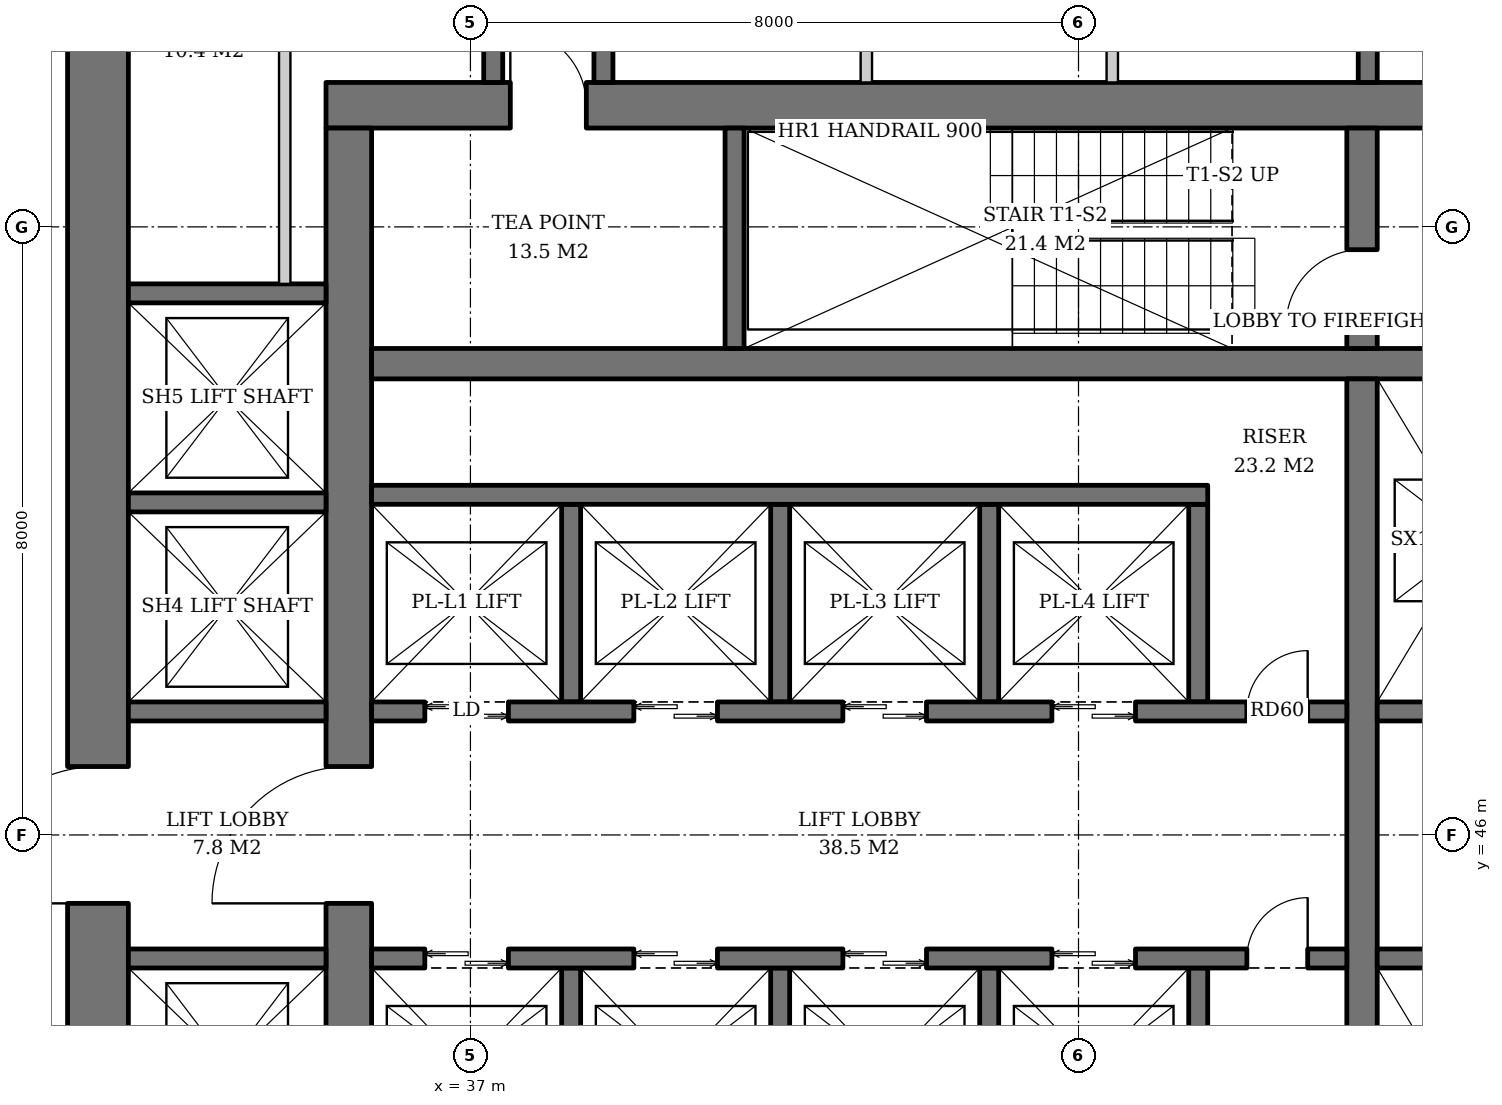
"""IFC4 building model, lengths in metres.
Left out: names, types, materials, properties, quantities, classifications, styles, units other than length and angle.
Written with IfcOpenShell. Run it as: python <this file> out.ifc"""

import sys

from ifc_helpers import new_model, si_unit, direction, frame, frame_2d, origin, place, context, subcontext, project, spatial, rectangle, extrude, element, fill, save


model = new_model("IFC4")
c1 = context("Model", 3, precision=1e-05, world=origin(), true_north=direction((0.0, 1.0)))
c2 = subcontext(c1, "Body", "Model", "MODEL_VIEW")
j1 = project(units=[si_unit("LENGTHUNIT", "METRE"), si_unit("PLANEANGLEUNIT", "RADIAN")], contexts=[c1])
p1 = place(None, origin())
s1 = spatial("IfcSite", under=j1, at=p1, CompositionType="ELEMENT")
p2 = place(p1, origin())
s2 = spatial("IfcBuilding", under=s1, at=p2, CompositionType="ELEMENT")
p3 = place(p2, frame((0.0, 0.0, 59.0)))
s3 = spatial("IfcBuildingStorey", under=s2, at=p3, CompositionType="ELEMENT", Elevation=59.0)
p4 = place(p3, frame((35.1, 55.6, 0.0), z_axis=(0.0, 0.0, 1.0), x_axis=(1.0, 0.0, 0.0)))
e1 = element("IfcWall", 1, at=p4, inside=s3, PredefinedType="SHEAR", context=c2, shape_type="SweptSolid", body=[
    extrude(rectangle(XDim=19.8, YDim=0.6, at=frame_2d((9.9, 0.0))), origin(), (0.0, 0.0, 1.0), 3.8),
])
p5 = place(p4, frame((14.54, 0.0, 0.0)))
e2 = element("IfcOpeningElement", 2, at=p5, cuts=e1, PredefinedType="OPENING", context=c2, shape_type="SweptSolid", body=[
    extrude(rectangle(XDim=1.0, YDim=2.1, at=frame_2d((0.5, 1.05))), frame((0.0, 0.31, 0.0), z_axis=(0.0, -1.0, 0.0), x_axis=(1.0, 0.0, 0.0)), (0.0, 0.0, 1.0), 0.62),
])
p6 = place(p4, frame((2.425, 0.0, 0.0)))
e3 = element("IfcOpeningElement", 3, at=p6, cuts=e1, PredefinedType="OPENING", context=c2, shape_type="SweptSolid", body=[
    extrude(rectangle(XDim=1.0, YDim=2.1, at=frame_2d((0.5, 1.05))), frame((0.0, 0.31, 0.0), z_axis=(0.0, -1.0, 0.0), x_axis=(1.0, 0.0, 0.0)), (0.0, 0.0, 1.0), 0.62),
])
p7 = place(p3, frame((35.4, 36.7, 0.0), z_axis=(0.0, 0.0, 1.0), x_axis=(0.0, 1.0, 0.0)))
e4 = element("IfcWall", 4, at=p7, inside=s3, PredefinedType="SHEAR", context=c2, shape_type="SweptSolid", body=[
    extrude(rectangle(XDim=18.6, YDim=0.6, at=frame_2d((9.3, 0.0))), origin(), (0.0, 0.0, 1.0), 3.8),
])
p8 = place(p7, frame((8.4, 0.0, 0.0)))
e5 = element("IfcOpeningElement", 5, at=p8, cuts=e4, PredefinedType="OPENING", context=c2, shape_type="SweptSolid", body=[
    extrude(rectangle(XDim=1.8, YDim=2.4, at=frame_2d((0.9, 1.2))), frame((0.0, 0.31, 0.0), z_axis=(0.0, -1.0, 0.0), x_axis=(1.0, 0.0, 0.0)), (0.0, 0.0, 1.0), 0.62),
])
p9 = place(p3, frame((32.1, 33.5, 0.0), z_axis=(0.0, 0.0, 1.0), x_axis=(0.0, 1.0, 0.0)))
e6 = element("IfcWall", 6, at=p9, inside=s3, PredefinedType="SHEAR", context=c2, shape_type="SweptSolid", body=[
    extrude(rectangle(XDim=25.0, YDim=0.8, at=frame_2d((12.5, 0.0))), origin(), (0.0, 0.0, 1.0), 3.8),
])
p10 = place(p9, frame((11.6, 0.0, 0.0)))
e7 = element("IfcOpeningElement", 7, at=p10, cuts=e6, PredefinedType="OPENING", context=c2, shape_type="SweptSolid", body=[
    extrude(rectangle(XDim=1.8, YDim=2.4, at=frame_2d((0.9, 1.2))), frame((0.0, 0.41, 0.0), z_axis=(0.0, -1.0, 0.0), x_axis=(1.0, 0.0, 0.0)), (0.0, 0.0, 1.0), 0.82),
])
p11 = place(p3, frame((35.7, 52.2, 0.0), z_axis=(0.0, 0.0, 1.0), x_axis=(1.0, 0.0, 0.0)))
e8 = element("IfcWall", 8, at=p11, inside=s3, PredefinedType="SHEAR", context=c2, shape_type="SweptSolid", body=[
    extrude(rectangle(XDim=18.6, YDim=0.4, at=frame_2d((9.3, 0.0))), origin(), (0.0, 0.0, 1.0), 3.8),
])
p12 = place(p3, frame((48.73, 40.0, 0.0), z_axis=(0.0, 0.0, 1.0), x_axis=(0.0, 1.0, 0.0)))
e9 = element("IfcWall", 9, at=p12, inside=s3, PredefinedType="SHEAR", context=c2, shape_type="SweptSolid", body=[
    extrude(rectangle(XDim=12.0, YDim=0.4, at=frame_2d((6.0, 0.0))), origin(), (0.0, 0.0, 1.0), 3.8),
])
p13 = place(p3, frame((48.73, 52.4, 0.0), z_axis=(0.0, 0.0, 1.0), x_axis=(0.0, 1.0, 0.0)))
e10 = element("IfcWall", 10, at=p13, inside=s3, PredefinedType="SHEAR", context=c2, shape_type="SweptSolid", body=[
    extrude(rectangle(XDim=2.9, YDim=0.4, at=frame_2d((1.45, 0.0))), origin(), (0.0, 0.0, 1.0), 3.8),
])
p14 = place(p13, frame((0.3, 0.0, 0.0)))
e11 = element("IfcOpeningElement", 11, at=p14, cuts=e10, PredefinedType="OPENING", context=c2, shape_type="SweptSolid", body=[
    extrude(rectangle(XDim=1.0, YDim=2.1, at=frame_2d((0.5, 1.05))), frame((0.0, 0.21, 0.0), z_axis=(0.0, -1.0, 0.0), x_axis=(1.0, 0.0, 0.0)), (0.0, 0.0, 1.0), 0.42),
])
p15 = place(p3, frame((40.475, 52.4, 0.0), z_axis=(0.0, 0.0, 1.0), x_axis=(0.0, 1.0, 0.0)))
e12 = element("IfcWall", 12, at=p15, inside=s3, PredefinedType="SHEAR", context=c2, shape_type="SweptSolid", body=[
    extrude(rectangle(XDim=2.9, YDim=0.25, at=frame_2d((1.45, 0.0))), origin(), (0.0, 0.0, 1.0), 3.8),
])
for number, where, z_axis, x_axis in (
    (13, (38.325, 47.75, 0.0), (0.0, 0.0, 1.0), (0.0, 1.0, 0.0)),
    (14, (41.075, 47.75, 0.0), (0.0, 0.0, 1.0), (0.0, 1.0, 0.0)),
    (15, (43.825, 47.75, 0.0), (0.0, 0.0, 1.0), (0.0, 1.0, 0.0)),
    (16, (46.575, 47.75, 0.0), (0.0, 0.0, 1.0), (0.0, 1.0, 0.0)),
):
    element("IfcWall", number, at=place(p3, frame(where, z_axis=z_axis, x_axis=x_axis)), inside=s3, PredefinedType="SHEAR", context=c2, shape_type="SweptSolid", body=[
        extrude(rectangle(XDim=2.6, YDim=0.25, at=frame_2d((1.3, 0.0))), origin(), (0.0, 0.0, 1.0), 3.8),
    ])
p16 = place(p3, frame((35.7, 50.475, 0.0), z_axis=(0.0, 0.0, 1.0), x_axis=(1.0, 0.0, 0.0)))
e17 = element("IfcWall", 17, at=p16, inside=s3, PredefinedType="SHEAR", context=c2, shape_type="SweptSolid", body=[
    extrude(rectangle(XDim=11.0, YDim=0.25, at=frame_2d((5.5, 0.0))), origin(), (0.0, 0.0, 1.0), 3.8),
])
p17 = place(p3, frame((35.7, 47.625, 0.0), z_axis=(0.0, 0.0, 1.0), x_axis=(1.0, 0.0, 0.0)))
e18 = element("IfcWall", 18, at=p17, inside=s3, PredefinedType="SHEAR", context=c2, shape_type="SweptSolid", body=[
    extrude(rectangle(XDim=12.83, YDim=0.25, at=frame_2d((6.415, 0.0))), origin(), (0.0, 0.0, 1.0), 3.8),
])
p18 = place(p17, frame((0.7, 0.0, 0.0)))
e19 = element("IfcOpeningElement", 19, at=p18, cuts=e18, PredefinedType="OPENING", context=c2, shape_type="SweptSolid", body=[
    extrude(rectangle(XDim=1.1, YDim=2.2, at=frame_2d((0.55, 1.1))), frame((0.0, 0.135, 0.0), z_axis=(0.0, -1.0, 0.0), x_axis=(1.0, 0.0, 0.0)), (0.0, 0.0, 1.0), 0.27),
])
p19 = place(p17, frame((3.45, 0.0, 0.0)))
e20 = element("IfcOpeningElement", 20, at=p19, cuts=e18, PredefinedType="OPENING", context=c2, shape_type="SweptSolid", body=[
    extrude(rectangle(XDim=1.1, YDim=2.2, at=frame_2d((0.55, 1.1))), frame((0.0, 0.135, 0.0), z_axis=(0.0, -1.0, 0.0), x_axis=(1.0, 0.0, 0.0)), (0.0, 0.0, 1.0), 0.27),
])
p20 = place(p17, frame((6.2, 0.0, 0.0)))
e21 = element("IfcOpeningElement", 21, at=p20, cuts=e18, PredefinedType="OPENING", context=c2, shape_type="SweptSolid", body=[
    extrude(rectangle(XDim=1.1, YDim=2.2, at=frame_2d((0.55, 1.1))), frame((0.0, 0.135, 0.0), z_axis=(0.0, -1.0, 0.0), x_axis=(1.0, 0.0, 0.0)), (0.0, 0.0, 1.0), 0.27),
])
p21 = place(p17, frame((8.95, 0.0, 0.0)))
e22 = element("IfcOpeningElement", 22, at=p21, cuts=e18, PredefinedType="OPENING", context=c2, shape_type="SweptSolid", body=[
    extrude(rectangle(XDim=1.1, YDim=2.2, at=frame_2d((0.55, 1.1))), frame((0.0, 0.135, 0.0), z_axis=(0.0, -1.0, 0.0), x_axis=(1.0, 0.0, 0.0)), (0.0, 0.0, 1.0), 0.27),
])
p22 = place(p17, frame((11.515, 0.0, 0.0)))
e23 = element("IfcOpeningElement", 23, at=p22, cuts=e18, PredefinedType="OPENING", context=c2, shape_type="SweptSolid", body=[
    extrude(rectangle(XDim=0.8, YDim=2.0, at=frame_2d((0.4, 1.0))), frame((0.0, 0.135, 0.0), z_axis=(0.0, -1.0, 0.0), x_axis=(1.0, 0.0, 0.0)), (0.0, 0.0, 1.0), 0.27),
])
for number, where, z_axis, x_axis in (
    (24, (38.325, 44.25, 0.0), (0.0, 0.0, 1.0), (0.0, -1.0, 0.0)),
    (25, (41.075, 44.25, 0.0), (0.0, 0.0, 1.0), (0.0, -1.0, 0.0)),
    (26, (43.825, 44.25, 0.0), (0.0, 0.0, 1.0), (0.0, -1.0, 0.0)),
    (27, (46.575, 44.25, 0.0), (0.0, 0.0, 1.0), (0.0, -1.0, 0.0)),
):
    element("IfcWall", number, at=place(p3, frame(where, z_axis=z_axis, x_axis=x_axis)), inside=s3, PredefinedType="SHEAR", context=c2, shape_type="SweptSolid", body=[
        extrude(rectangle(XDim=2.6, YDim=0.25, at=frame_2d((1.3, 0.0))), origin(), (0.0, 0.0, 1.0), 3.8),
    ])
p23 = place(p3, frame((35.7, 44.375, 0.0), z_axis=(0.0, 0.0, 1.0), x_axis=(1.0, 0.0, 0.0)))
e28 = element("IfcWall", 28, at=p23, inside=s3, PredefinedType="SHEAR", context=c2, shape_type="SweptSolid", body=[
    extrude(rectangle(XDim=12.83, YDim=0.25, at=frame_2d((6.415, 0.0))), origin(), (0.0, 0.0, 1.0), 3.8),
])
p24 = place(p23, frame((0.7, 0.0, 0.0)))
e29 = element("IfcOpeningElement", 29, at=p24, cuts=e28, PredefinedType="OPENING", context=c2, shape_type="SweptSolid", body=[
    extrude(rectangle(XDim=1.1, YDim=2.2, at=frame_2d((0.55, 1.1))), frame((0.0, 0.135, 0.0), z_axis=(0.0, -1.0, 0.0), x_axis=(1.0, 0.0, 0.0)), (0.0, 0.0, 1.0), 0.27),
])
p25 = place(p23, frame((3.45, 0.0, 0.0)))
e30 = element("IfcOpeningElement", 30, at=p25, cuts=e28, PredefinedType="OPENING", context=c2, shape_type="SweptSolid", body=[
    extrude(rectangle(XDim=1.1, YDim=2.2, at=frame_2d((0.55, 1.1))), frame((0.0, 0.135, 0.0), z_axis=(0.0, -1.0, 0.0), x_axis=(1.0, 0.0, 0.0)), (0.0, 0.0, 1.0), 0.27),
])
p26 = place(p23, frame((6.2, 0.0, 0.0)))
e31 = element("IfcOpeningElement", 31, at=p26, cuts=e28, PredefinedType="OPENING", context=c2, shape_type="SweptSolid", body=[
    extrude(rectangle(XDim=1.1, YDim=2.2, at=frame_2d((0.55, 1.1))), frame((0.0, 0.135, 0.0), z_axis=(0.0, -1.0, 0.0), x_axis=(1.0, 0.0, 0.0)), (0.0, 0.0, 1.0), 0.27),
])
p27 = place(p23, frame((8.95, 0.0, 0.0)))
e32 = element("IfcOpeningElement", 32, at=p27, cuts=e28, PredefinedType="OPENING", context=c2, shape_type="SweptSolid", body=[
    extrude(rectangle(XDim=1.1, YDim=2.2, at=frame_2d((0.55, 1.1))), frame((0.0, 0.135, 0.0), z_axis=(0.0, -1.0, 0.0), x_axis=(1.0, 0.0, 0.0)), (0.0, 0.0, 1.0), 0.27),
])
p28 = place(p23, frame((11.515, 0.0, 0.0)))
e33 = element("IfcOpeningElement", 33, at=p28, cuts=e28, PredefinedType="OPENING", context=c2, shape_type="SweptSolid", body=[
    extrude(rectangle(XDim=0.8, YDim=2.0, at=frame_2d((0.4, 1.0))), frame((0.0, 0.135, 0.0), z_axis=(0.0, -1.0, 0.0), x_axis=(1.0, 0.0, 0.0)), (0.0, 0.0, 1.0), 0.27),
])
for number, where, z_axis, x_axis in (
    (34, (48.93, 47.625, 0.0), (0.0, 0.0, 1.0), (1.0, 0.0, 0.0)),
    (35, (48.93, 44.375, 0.0), (0.0, 0.0, 1.0), (1.0, 0.0, 0.0)),
):
    element("IfcWall", number, at=place(p3, frame(where, z_axis=z_axis, x_axis=x_axis)), inside=s3, PredefinedType="SHEAR", context=c2, shape_type="SweptSolid", body=[
        extrude(rectangle(XDim=5.37, YDim=0.25, at=frame_2d((2.685, 0.0))), origin(), (0.0, 0.0, 1.0), 3.8),
    ])
for number, where, z_axis, x_axis in (
    (36, (32.5, 44.375, 0.0), (0.0, 0.0, 1.0), (1.0, 0.0, 0.0)),
    (37, (32.5, 47.625, 0.0), (0.0, 0.0, 1.0), (1.0, 0.0, 0.0)),
    (38, (32.5, 50.375, 0.0), (0.0, 0.0, 1.0), (1.0, 0.0, 0.0)),
    (39, (32.5, 53.125, 0.0), (0.0, 0.0, 1.0), (1.0, 0.0, 0.0)),
):
    element("IfcWall", number, at=place(p3, frame(where, z_axis=z_axis, x_axis=x_axis)), inside=s3, PredefinedType="SHEAR", context=c2, shape_type="SweptSolid", body=[
        extrude(rectangle(XDim=2.6, YDim=0.25, at=frame_2d((1.3, 0.0))), origin(), (0.0, 0.0, 1.0), 3.8),
    ])
for number, where, z_axis, x_axis in (
    (40, (48.805, 55.9, 0.0), (0.0, 0.0, 1.0), (0.0, 1.0, 0.0)),
    (41, (37.3, 55.9, 0.0), (0.0, 0.0, 1.0), (0.0, 1.0, 0.0)),
    (42, (38.75, 55.9, 0.0), (0.0, 0.0, 1.0), (0.0, 1.0, 0.0)),
):
    element("IfcWall", number, at=place(p3, frame(where, z_axis=z_axis, x_axis=x_axis)), inside=s3, PredefinedType="SOLIDWALL", context=c2, shape_type="SweptSolid", body=[
        extrude(rectangle(XDim=2.6, YDim=0.25, at=frame_2d((1.3, 0.0))), origin(), (0.0, 0.0, 1.0), 3.62),
    ])
p29 = place(p3, frame((34.557, 53.25, 0.0), z_axis=(0.0, 0.0, 1.0), x_axis=(0.0, 1.0, 0.0)))
e43 = element("IfcWall", 43, at=p29, inside=s3, PredefinedType="SOLIDWALL", context=c2, shape_type="SweptSolid", body=[
    extrude(rectangle(XDim=5.25, YDim=0.15, at=frame_2d((2.625, 0.0))), origin(), (0.0, 0.0, 1.0), 3.62),
])
for number, where, z_axis, x_axis in (
    (44, (42.209, 55.9, 0.0), (0.0, 0.0, 1.0), (0.0, 1.0, 0.0)),
    (45, (45.444, 55.9, 0.0), (0.0, 0.0, 1.0), (0.0, 1.0, 0.0)),
):
    element("IfcWall", number, at=place(p3, frame(where, z_axis=z_axis, x_axis=x_axis)), inside=s3, PredefinedType="SOLIDWALL", context=c2, shape_type="SweptSolid", body=[
        extrude(rectangle(XDim=2.6, YDim=0.15, at=frame_2d((1.3, 0.0))), origin(), (0.0, 0.0, 1.0), 3.62),
    ])
p30 = place(p18, origin())
e46 = element("IfcDoor", 46, at=p30, inside=s3, OperationType="DOUBLE_DOOR_SLIDING", PredefinedType="DOOR", context=c2, shape_type="SweptSolid", body=[
    extrude(rectangle(XDim=1.1, YDim=2.2, at=frame_2d((0.55, 1.1))), frame((0.0, 0.025, 0.0), z_axis=(0.0, -1.0, 0.0), x_axis=(1.0, 0.0, 0.0)), (0.0, 0.0, 1.0), 0.05),
])
fill(e19, e46)
p31 = place(p19, origin())
e47 = element("IfcDoor", 47, at=p31, inside=s3, OperationType="DOUBLE_DOOR_SLIDING", PredefinedType="DOOR", context=c2, shape_type="SweptSolid", body=[
    extrude(rectangle(XDim=1.1, YDim=2.2, at=frame_2d((0.55, 1.1))), frame((0.0, 0.025, 0.0), z_axis=(0.0, -1.0, 0.0), x_axis=(1.0, 0.0, 0.0)), (0.0, 0.0, 1.0), 0.05),
])
fill(e20, e47)
p32 = place(p20, origin())
e48 = element("IfcDoor", 48, at=p32, inside=s3, OperationType="DOUBLE_DOOR_SLIDING", PredefinedType="DOOR", context=c2, shape_type="SweptSolid", body=[
    extrude(rectangle(XDim=1.1, YDim=2.2, at=frame_2d((0.55, 1.1))), frame((0.0, 0.025, 0.0), z_axis=(0.0, -1.0, 0.0), x_axis=(1.0, 0.0, 0.0)), (0.0, 0.0, 1.0), 0.05),
])
fill(e21, e48)
p33 = place(p21, origin())
e49 = element("IfcDoor", 49, at=p33, inside=s3, OperationType="DOUBLE_DOOR_SLIDING", PredefinedType="DOOR", context=c2, shape_type="SweptSolid", body=[
    extrude(rectangle(XDim=1.1, YDim=2.2, at=frame_2d((0.55, 1.1))), frame((0.0, 0.025, 0.0), z_axis=(0.0, -1.0, 0.0), x_axis=(1.0, 0.0, 0.0)), (0.0, 0.0, 1.0), 0.05),
])
fill(e22, e49)
p34 = place(p22, origin())
e50 = element("IfcDoor", 50, at=p34, inside=s3, OperationType="SINGLE_SWING_RIGHT", PredefinedType="DOOR", context=c2, shape_type="SweptSolid", body=[
    extrude(rectangle(XDim=0.8, YDim=2.0, at=frame_2d((0.4, 1.0))), frame((0.0, 0.025, 0.0), z_axis=(0.0, -1.0, 0.0), x_axis=(1.0, 0.0, 0.0)), (0.0, 0.0, 1.0), 0.05),
])
fill(e23, e50)
p35 = place(p24, origin())
e51 = element("IfcDoor", 51, at=p35, inside=s3, OperationType="DOUBLE_DOOR_SLIDING", PredefinedType="DOOR", context=c2, shape_type="SweptSolid", body=[
    extrude(rectangle(XDim=1.1, YDim=2.2, at=frame_2d((0.55, 1.1))), frame((0.0, 0.025, 0.0), z_axis=(0.0, -1.0, 0.0), x_axis=(1.0, 0.0, 0.0)), (0.0, 0.0, 1.0), 0.05),
])
fill(e29, e51)
p36 = place(p25, origin())
e52 = element("IfcDoor", 52, at=p36, inside=s3, OperationType="DOUBLE_DOOR_SLIDING", PredefinedType="DOOR", context=c2, shape_type="SweptSolid", body=[
    extrude(rectangle(XDim=1.1, YDim=2.2, at=frame_2d((0.55, 1.1))), frame((0.0, 0.025, 0.0), z_axis=(0.0, -1.0, 0.0), x_axis=(1.0, 0.0, 0.0)), (0.0, 0.0, 1.0), 0.05),
])
fill(e30, e52)
p37 = place(p26, origin())
e53 = element("IfcDoor", 53, at=p37, inside=s3, OperationType="DOUBLE_DOOR_SLIDING", PredefinedType="DOOR", context=c2, shape_type="SweptSolid", body=[
    extrude(rectangle(XDim=1.1, YDim=2.2, at=frame_2d((0.55, 1.1))), frame((0.0, 0.025, 0.0), z_axis=(0.0, -1.0, 0.0), x_axis=(1.0, 0.0, 0.0)), (0.0, 0.0, 1.0), 0.05),
])
fill(e31, e53)
p38 = place(p27, origin())
e54 = element("IfcDoor", 54, at=p38, inside=s3, OperationType="DOUBLE_DOOR_SLIDING", PredefinedType="DOOR", context=c2, shape_type="SweptSolid", body=[
    extrude(rectangle(XDim=1.1, YDim=2.2, at=frame_2d((0.55, 1.1))), frame((0.0, 0.025, 0.0), z_axis=(0.0, -1.0, 0.0), x_axis=(1.0, 0.0, 0.0)), (0.0, 0.0, 1.0), 0.05),
])
fill(e32, e54)
p39 = place(p28, origin())
e55 = element("IfcDoor", 55, at=p39, inside=s3, OperationType="SINGLE_SWING_RIGHT", PredefinedType="DOOR", context=c2, shape_type="SweptSolid", body=[
    extrude(rectangle(XDim=0.8, YDim=2.0, at=frame_2d((0.4, 1.0))), frame((0.0, 0.025, 0.0), z_axis=(0.0, -1.0, 0.0), x_axis=(1.0, 0.0, 0.0)), (0.0, 0.0, 1.0), 0.05),
])
fill(e33, e55)
p40 = place(p14, origin())
e56 = element("IfcDoor", 56, at=p40, inside=s3, OperationType="SINGLE_SWING_LEFT", PredefinedType="DOOR", context=c2, shape_type="SweptSolid", body=[
    extrude(rectangle(XDim=1.0, YDim=2.1, at=frame_2d((0.5, 1.05))), frame((0.0, 0.025, 0.0), z_axis=(0.0, -1.0, 0.0), x_axis=(1.0, 0.0, 0.0)), (0.0, 0.0, 1.0), 0.05),
])
fill(e11, e56)
p41 = place(p8, origin())
e57 = element("IfcDoor", 57, at=p41, inside=s3, OperationType="DOUBLE_DOOR_SINGLE_SWING", PredefinedType="DOOR", context=c2, shape_type="SweptSolid", body=[
    extrude(rectangle(XDim=1.8, YDim=2.4, at=frame_2d((0.9, 1.2))), frame((0.0, 0.025, 0.0), z_axis=(0.0, -1.0, 0.0), x_axis=(1.0, 0.0, 0.0)), (0.0, 0.0, 1.0), 0.05),
])
fill(e5, e57)
p42 = place(p10, origin())
e58 = element("IfcDoor", 58, at=p42, inside=s3, OperationType="DOUBLE_DOOR_SINGLE_SWING", PredefinedType="DOOR", context=c2, shape_type="SweptSolid", body=[
    extrude(rectangle(XDim=1.8, YDim=2.4, at=frame_2d((0.9, 1.2))), frame((0.0, 0.025, 0.0), z_axis=(0.0, -1.0, 0.0), x_axis=(1.0, 0.0, 0.0)), (0.0, 0.0, 1.0), 0.05),
])
fill(e7, e58)
p43 = place(p6, origin())
e59 = element("IfcDoor", 59, at=p43, inside=s3, OperationType="SINGLE_SWING_LEFT", PredefinedType="DOOR", context=c2, shape_type="SweptSolid", body=[
    extrude(rectangle(XDim=1.0, YDim=2.1, at=frame_2d((0.5, 1.05))), frame((0.0, -0.24, 0.0), z_axis=(0.0, -1.0, 0.0), x_axis=(1.0, 0.0, 0.0)), (0.0, 0.0, 1.0), 0.05),
])
fill(e3, e59)
save(model, sys.argv[1])
